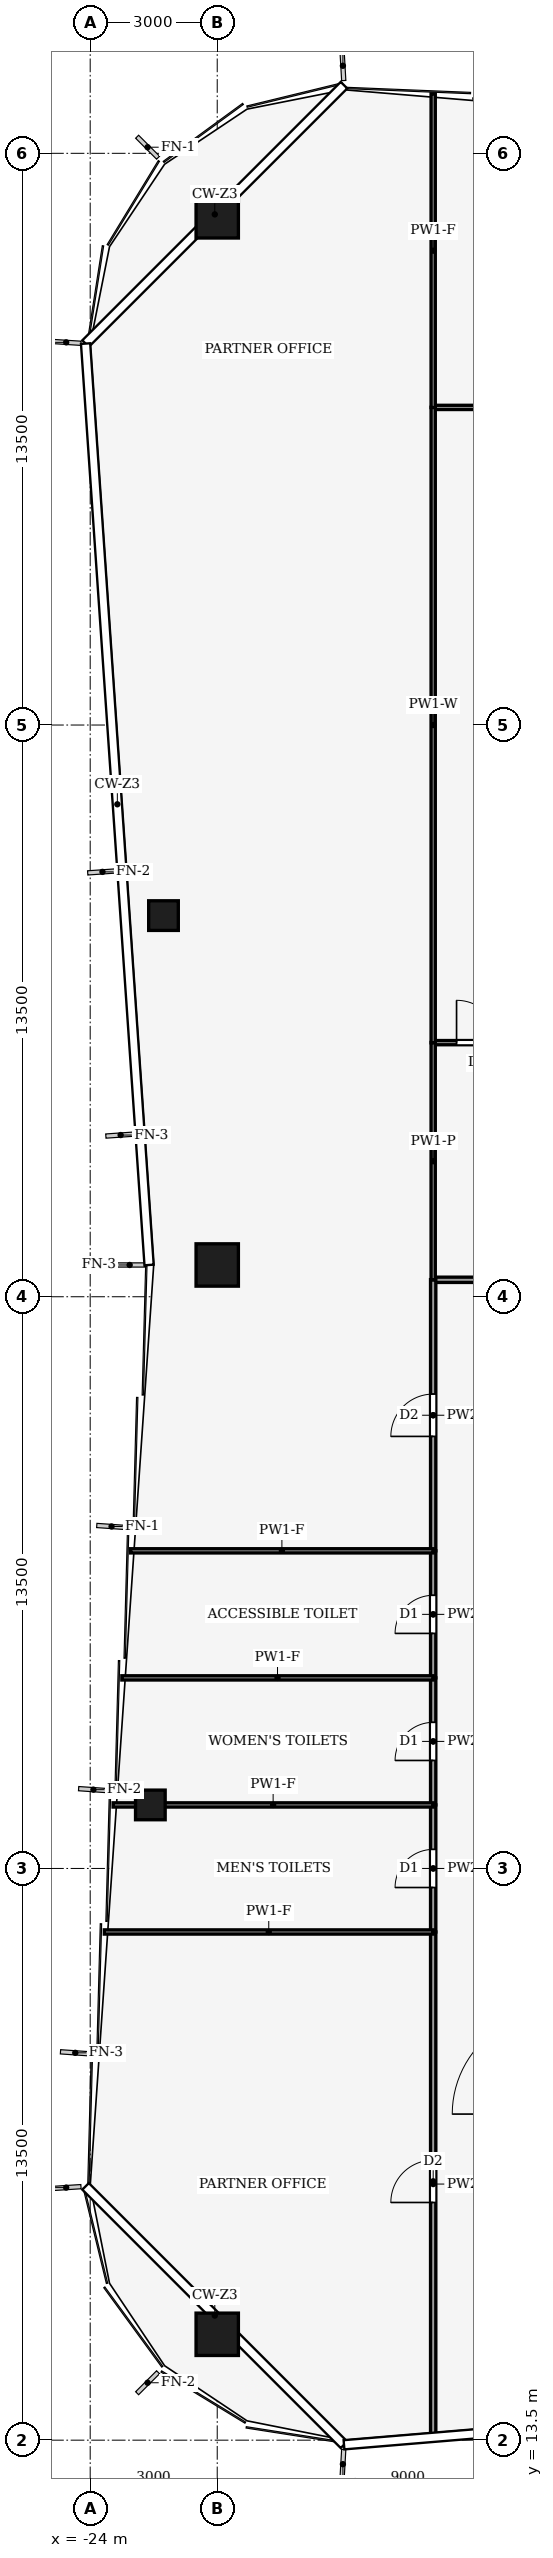
"""IFC4 building model, lengths in metres.
Left out: names, types, materials, properties, quantities, classifications, styles, units other than length and angle.
Written with IfcOpenShell. Run it as: python <this file> out.ifc"""

import sys

from ifc_helpers import new_model, si_unit, direction, frame, frame_2d, origin, origin_2d, place, context, subcontext, project, spatial, rectangle, hollow_rectangle, extrude, element, fill, save


model = new_model("IFC4")
c1 = context("Model", 3, precision=1e-05, world=origin(), true_north=direction((0.0, 1.0)))
c2 = subcontext(c1, "Body", "Model", "MODEL_VIEW")
j1 = project(units=[si_unit("LENGTHUNIT", "METRE"), si_unit("PLANEANGLEUNIT", "RADIAN")], contexts=[c1])
p1 = place(None, origin())
s1 = spatial("IfcSite", under=j1, at=p1, CompositionType="ELEMENT")
p2 = place(p1, origin())
s2 = spatial("IfcBuilding", under=s1, at=p2, CompositionType="ELEMENT")
p3 = place(p2, frame((0.0, 0.0, 182.0)))
s3 = spatial("IfcBuildingStorey", under=s2, at=p3, CompositionType="ELEMENT", Elevation=182.0)
for number, where, z_axis, x_axis in (
    (1, (-21.0, 66.0, 0.0), (0.0, 0.0, 1.0), (1.0, 0.0, 0.0)),
    (2, (-21.0, 16.0, 0.0), (0.0, 0.0, 1.0), (1.0, 0.0, 0.0)),
    (3, (-21.0, 41.25, 0.0), (0.0, 0.0, 1.0), (1.0, 0.0, 0.0)),
):
    element("IfcColumn", number, at=place(p3, frame(where, z_axis=z_axis, x_axis=x_axis)), inside=s3, PredefinedType="COLUMN", context=c2, shape_type="SweptSolid", body=[
        extrude(hollow_rectangle(XDim=1.0, YDim=1.0, WallThickness=0.06, at=origin_2d()), origin(), (0.0, 0.0, 1.0), 4.0),
    ])
for number, where, z_axis, x_axis in (
    (4, (-22.579, 28.5, 0.0), (0.0, 0.0, 1.0), (1.0, 0.0, 0.0)),
    (5, (-22.269, 49.5, 0.0), (0.0, 0.0, 1.0), (1.0, 0.0, 0.0)),
):
    element("IfcColumn", number, at=place(p3, frame(where, z_axis=z_axis, x_axis=x_axis)), inside=s3, PredefinedType="COLUMN", context=c2, shape_type="SweptSolid", body=[
        extrude(hollow_rectangle(XDim=0.7, YDim=0.7, WallThickness=0.03, at=origin_2d()), origin(), (0.0, 0.0, 1.0), 4.0),
    ])
p4 = place(p3, frame((-15.9, 40.9, 0.0), z_axis=(0.0, 0.0, 1.0), x_axis=(1.0, 0.0, 0.0)))
e6 = element("IfcWall", 6, at=p4, inside=s3, PredefinedType="PARTITIONING", context=c2, shape_type="SweptSolid", body=[
    extrude(rectangle(XDim=6.9, YDim=0.125, at=frame_2d((3.45, 0.0))), origin(), (0.0, 0.0, 1.0), 3.44),
])
p5 = place(p4, frame((2.95, 0.0, 0.0)))
e7 = element("IfcOpeningElement", 7, at=p5, cuts=e6, PredefinedType="OPENING", context=c2, shape_type="SweptSolid", body=[
    extrude(rectangle(XDim=1.0, YDim=2.1, at=frame_2d((0.5, 1.05))), frame((0.0, 0.073, 0.0), z_axis=(0.0, -1.0, 0.0), x_axis=(1.0, 0.0, 0.0)), (0.0, 0.0, 1.0), 0.145),
])
p6 = place(p3, frame((-15.9, 13.595, 0.0), z_axis=(0.0, 0.0, 1.0), x_axis=(0.0, 1.0, 0.0)))
e8 = element("IfcWall", 8, at=p6, inside=s3, PredefinedType="PARTITIONING", context=c2, shape_type="SweptSolid", body=[
    extrude(rectangle(XDim=11.905, YDim=0.125, at=frame_2d((5.953, 0.0))), origin(), (0.0, 0.0, 1.0), 3.04),
])
p7 = place(p6, frame((5.518, 0.0, 0.0)))
e9 = element("IfcOpeningElement", 9, at=p7, cuts=e8, PredefinedType="OPENING", context=c2, shape_type="SweptSolid", body=[
    extrude(rectangle(XDim=1.0, YDim=2.1, at=frame_2d((0.5, 1.05))), frame((0.0, 0.073, 0.0), z_axis=(0.0, -1.0, 0.0), x_axis=(1.0, 0.0, 0.0)), (0.0, 0.0, 1.0), 0.145),
])
p8 = place(p3, frame((-15.9, 25.5, 0.0), z_axis=(0.0, 0.0, 1.0), x_axis=(0.0, 1.0, 0.0)))
e10 = element("IfcWall", 10, at=p8, inside=s3, PredefinedType="PARTITIONING", context=c2, shape_type="SweptSolid", body=[
    extrude(rectangle(XDim=3.0, YDim=0.125, at=frame_2d((1.5, 0.0))), origin(), (0.0, 0.0, 1.0), 3.87),
])
p9 = place(p8, frame((1.05, 0.0, 0.0)))
e11 = element("IfcOpeningElement", 11, at=p9, cuts=e10, PredefinedType="OPENING", context=c2, shape_type="SweptSolid", body=[
    extrude(rectangle(XDim=0.9, YDim=2.1, at=frame_2d((0.45, 1.05))), frame((0.0, 0.073, 0.0), z_axis=(0.0, -1.0, 0.0), x_axis=(1.0, 0.0, 0.0)), (0.0, 0.0, 1.0), 0.145),
])
p10 = place(p3, frame((-15.9, 28.5, 0.0), z_axis=(0.0, 0.0, 1.0), x_axis=(0.0, 1.0, 0.0)))
e12 = element("IfcWall", 12, at=p10, inside=s3, PredefinedType="PARTITIONING", context=c2, shape_type="SweptSolid", body=[
    extrude(rectangle(XDim=3.0, YDim=0.125, at=frame_2d((1.5, 0.0))), origin(), (0.0, 0.0, 1.0), 3.87),
])
p11 = place(p10, frame((1.05, 0.0, 0.0)))
e13 = element("IfcOpeningElement", 13, at=p11, cuts=e12, PredefinedType="OPENING", context=c2, shape_type="SweptSolid", body=[
    extrude(rectangle(XDim=0.9, YDim=2.1, at=frame_2d((0.45, 1.05))), frame((0.0, 0.073, 0.0), z_axis=(0.0, -1.0, 0.0), x_axis=(1.0, 0.0, 0.0)), (0.0, 0.0, 1.0), 0.145),
])
p12 = place(p3, frame((-15.9, 31.5, 0.0), z_axis=(0.0, 0.0, 1.0), x_axis=(0.0, 1.0, 0.0)))
e14 = element("IfcWall", 14, at=p12, inside=s3, PredefinedType="PARTITIONING", context=c2, shape_type="SweptSolid", body=[
    extrude(rectangle(XDim=3.0, YDim=0.125, at=frame_2d((1.5, 0.0))), origin(), (0.0, 0.0, 1.0), 3.87),
])
p13 = place(p12, frame((1.05, 0.0, 0.0)))
e15 = element("IfcOpeningElement", 15, at=p13, cuts=e14, PredefinedType="OPENING", context=c2, shape_type="SweptSolid", body=[
    extrude(rectangle(XDim=0.9, YDim=2.1, at=frame_2d((0.45, 1.05))), frame((0.0, 0.073, 0.0), z_axis=(0.0, -1.0, 0.0), x_axis=(1.0, 0.0, 0.0)), (0.0, 0.0, 1.0), 0.145),
])
p14 = place(p3, frame((-15.9, 34.5, 0.0), z_axis=(0.0, 0.0, 1.0), x_axis=(0.0, 1.0, 0.0)))
e16 = element("IfcWall", 16, at=p14, inside=s3, PredefinedType="PARTITIONING", context=c2, shape_type="SweptSolid", body=[
    extrude(rectangle(XDim=6.404, YDim=0.125, at=frame_2d((3.202, 0.0))), origin(), (0.0, 0.0, 1.0), 3.14),
])
p15 = place(p14, frame((2.702, 0.0, 0.0)))
e17 = element("IfcOpeningElement", 17, at=p15, cuts=e16, PredefinedType="OPENING", context=c2, shape_type="SweptSolid", body=[
    extrude(rectangle(XDim=1.0, YDim=2.1, at=frame_2d((0.5, 1.05))), frame((0.0, 0.073, 0.0), z_axis=(0.0, -1.0, 0.0), x_axis=(1.0, 0.0, 0.0)), (0.0, 0.0, 1.0), 0.145),
])
p16 = place(p3, frame((-15.9, 46.5, 0.0), z_axis=(0.0, 0.0, 1.0), x_axis=(1.0, 0.0, 0.0)))
e18 = element("IfcWall", 18, at=p16, inside=s3, PredefinedType="PARTITIONING", context=c2, shape_type="SweptSolid", body=[
    extrude(rectangle(XDim=6.904, YDim=0.1, at=frame_2d((3.452, 0.0))), origin(), (0.0, 0.0, 1.0), 3.44),
])
p17 = place(p16, frame((0.552, 0.0, 0.0)))
e19 = element("IfcOpeningElement", 19, at=p17, cuts=e18, PredefinedType="OPENING", context=c2, shape_type="SweptSolid", body=[
    extrude(rectangle(XDim=1.0, YDim=2.1, at=frame_2d((0.5, 1.05))), frame((0.0, 0.06, 0.0), z_axis=(0.0, -1.0, 0.0), x_axis=(1.0, 0.0, 0.0)), (0.0, 0.0, 1.0), 0.12),
])
p18 = place(p3, frame((-15.9, 46.504, 0.0), z_axis=(0.0, 0.0, 1.0), x_axis=(0.0, -1.0, 0.0)))
e20 = element("IfcWall", 20, at=p18, inside=s3, PredefinedType="PARTITIONING", context=c2, shape_type="SweptSolid", body=[
    extrude(rectangle(XDim=5.608, YDim=0.1, at=frame_2d((2.804, 0.0))), origin(), (0.0, 0.0, 1.0), 3.44),
])
p19 = place(p3, frame((-15.9, 61.5, 0.0), z_axis=(0.0, 0.0, 1.0), x_axis=(1.0, 0.0, 0.0)))
e21 = element("IfcWall", 21, at=p19, inside=s3, PredefinedType="PARTITIONING", context=c2, shape_type="SweptSolid", body=[
    extrude(rectangle(XDim=9.9, YDim=0.1, at=frame_2d((4.95, 0.0))), origin(), (0.0, 0.0, 1.0), 3.24),
])
p20 = place(p19, frame((4.45, 0.0, 0.0)))
e22 = element("IfcOpeningElement", 22, at=p20, cuts=e21, PredefinedType="OPENING", context=c2, shape_type="SweptSolid", body=[
    extrude(rectangle(XDim=1.0, YDim=2.1, at=frame_2d((0.5, 1.05))), frame((0.0, 0.06, 0.0), z_axis=(0.0, -1.0, 0.0), x_axis=(1.0, 0.0, 0.0)), (0.0, 0.0, 1.0), 0.12),
])
p21 = place(p3, frame((-15.9, 61.504, 0.0), z_axis=(0.0, 0.0, 1.0), x_axis=(0.0, -1.0, 0.0)))
e23 = element("IfcWall", 23, at=p21, inside=s3, PredefinedType="PARTITIONING", context=c2, shape_type="SweptSolid", body=[
    extrude(rectangle(XDim=15.008, YDim=0.1, at=frame_2d((7.504, 0.0))), origin(), (0.0, 0.0, 1.0), 3.24),
])
p22 = place(p3, frame((-15.9, 68.905, 0.0), z_axis=(0.0, 0.0, 1.0), x_axis=(0.0, -1.0, 0.0)))
e24 = element("IfcWall", 24, at=p22, inside=s3, PredefinedType="PARTITIONING", context=c2, shape_type="SweptSolid", body=[
    extrude(rectangle(XDim=7.409, YDim=0.1, at=frame_2d((3.705, 0.0))), origin(), (0.0, 0.0, 1.0), 3.04),
])
p23 = place(p3, frame((-15.9, 25.5, 0.0), z_axis=(0.0, 0.0, 1.0), x_axis=(-1.0, 0.0, 0.0)))
e25 = element("IfcWall", 25, at=p23, inside=s3, PredefinedType="PARTITIONING", context=c2, shape_type="SweptSolid", body=[
    extrude(rectangle(XDim=7.766, YDim=0.1, at=frame_2d((3.883, 0.0))), origin(), (0.0, 0.0, 1.0), 3.04),
])
p24 = place(p3, frame((-15.9, 28.5, 0.0), z_axis=(0.0, 0.0, 1.0), x_axis=(-1.0, 0.0, 0.0)))
e26 = element("IfcWall", 26, at=p24, inside=s3, PredefinedType="PARTITIONING", context=c2, shape_type="SweptSolid", body=[
    extrude(rectangle(XDim=7.559, YDim=0.1, at=frame_2d((3.78, 0.0))), origin(), (0.0, 0.0, 1.0), 3.04),
])
p25 = place(p3, frame((-15.9, 31.5, 0.0), z_axis=(0.0, 0.0, 1.0), x_axis=(-1.0, 0.0, 0.0)))
e27 = element("IfcWall", 27, at=p25, inside=s3, PredefinedType="PARTITIONING", context=c2, shape_type="SweptSolid", body=[
    extrude(rectangle(XDim=7.353, YDim=0.1, at=frame_2d((3.676, 0.0))), origin(), (0.0, 0.0, 1.0), 3.04),
])
p26 = place(p3, frame((-15.9, 34.5, 0.0), z_axis=(0.0, 0.0, 1.0), x_axis=(-1.0, 0.0, 0.0)))
e28 = element("IfcWall", 28, at=p26, inside=s3, PredefinedType="PARTITIONING", context=c2, shape_type="SweptSolid", body=[
    extrude(rectangle(XDim=7.146, YDim=0.1, at=frame_2d((3.573, 0.0))), origin(), (0.0, 0.0, 1.0), 3.04),
])
p27 = place(p7, origin())
e29 = element("IfcDoor", 29, at=p27, inside=s3, OperationType="SINGLE_SWING_RIGHT", PredefinedType="DOOR", context=c2, shape_type="SweptSolid", body=[
    extrude(rectangle(XDim=1.0, YDim=2.1, at=frame_2d((0.5, 1.05))), frame((0.0, 0.025, 0.0), z_axis=(0.0, -1.0, 0.0), x_axis=(1.0, 0.0, 0.0)), (0.0, 0.0, 1.0), 0.05),
])
fill(e9, e29)
p28 = place(p9, origin())
e30 = element("IfcDoor", 30, at=p28, inside=s3, OperationType="SINGLE_SWING_RIGHT", PredefinedType="DOOR", context=c2, shape_type="SweptSolid", body=[
    extrude(rectangle(XDim=0.9, YDim=2.1, at=frame_2d((0.45, 1.05))), frame((0.0, 0.025, 0.0), z_axis=(0.0, -1.0, 0.0), x_axis=(1.0, 0.0, 0.0)), (0.0, 0.0, 1.0), 0.05),
])
fill(e11, e30)
p29 = place(p11, origin())
e31 = element("IfcDoor", 31, at=p29, inside=s3, OperationType="SINGLE_SWING_LEFT", PredefinedType="DOOR", context=c2, shape_type="SweptSolid", body=[
    extrude(rectangle(XDim=0.9, YDim=2.1, at=frame_2d((0.45, 1.05))), frame((0.0, 0.025, 0.0), z_axis=(0.0, -1.0, 0.0), x_axis=(1.0, 0.0, 0.0)), (0.0, 0.0, 1.0), 0.05),
])
fill(e13, e31)
p30 = place(p13, origin())
e32 = element("IfcDoor", 32, at=p30, inside=s3, OperationType="SINGLE_SWING_RIGHT", PredefinedType="DOOR", context=c2, shape_type="SweptSolid", body=[
    extrude(rectangle(XDim=0.9, YDim=2.1, at=frame_2d((0.45, 1.05))), frame((0.0, 0.025, 0.0), z_axis=(0.0, -1.0, 0.0), x_axis=(1.0, 0.0, 0.0)), (0.0, 0.0, 1.0), 0.05),
])
fill(e15, e32)
p31 = place(p15, origin())
e33 = element("IfcDoor", 33, at=p31, inside=s3, OperationType="SINGLE_SWING_LEFT", PredefinedType="DOOR", context=c2, shape_type="SweptSolid", body=[
    extrude(rectangle(XDim=1.0, YDim=2.1, at=frame_2d((0.5, 1.05))), frame((0.0, 0.025, 0.0), z_axis=(0.0, -1.0, 0.0), x_axis=(1.0, 0.0, 0.0)), (0.0, 0.0, 1.0), 0.05),
])
fill(e17, e33)
p32 = place(p17, origin())
e34 = element("IfcDoor", 34, at=p32, inside=s3, OperationType="SINGLE_SWING_LEFT", PredefinedType="DOOR", context=c2, shape_type="SweptSolid", body=[
    extrude(rectangle(XDim=1.0, YDim=2.1, at=frame_2d((0.5, 1.05))), frame((0.0, 0.025, 0.0), z_axis=(0.0, -1.0, 0.0), x_axis=(1.0, 0.0, 0.0)), (0.0, 0.0, 1.0), 0.05),
])
fill(e19, e34)
save(model, sys.argv[1])
